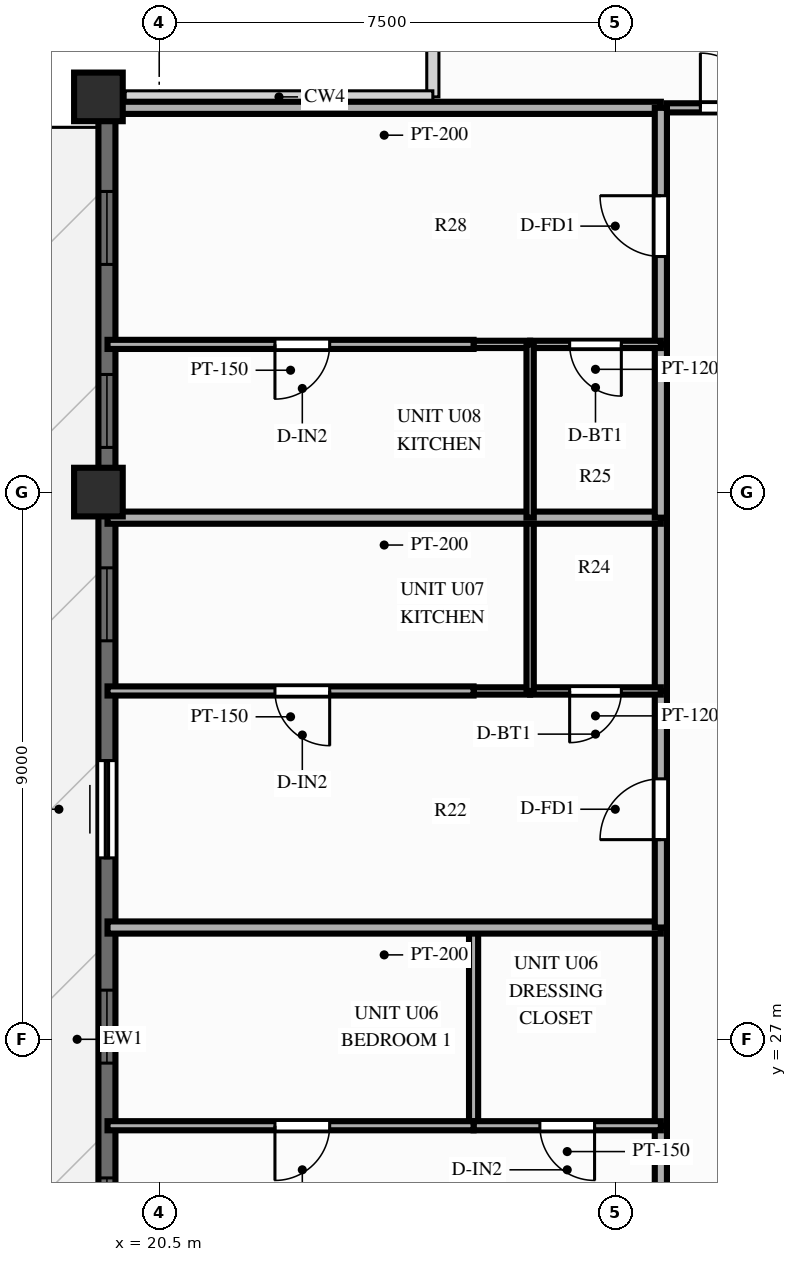
"""IFC4 building model, lengths in metres.
Left out: names, types, materials, properties, quantities, classifications, styles, units other than length and angle.
Written with IfcOpenShell. Run it as: python <this file> out.ifc"""

import sys

from ifc_helpers import new_model, si_unit, direction, frame, frame_2d, origin, origin_2d, place, context, subcontext, project, spatial, rectangle, extrude, source, transform, mapped, element, fill, save


model = new_model("IFC4")
c1 = context("Model", 3, precision=1e-05, world=origin(), true_north=direction((0.0, 1.0)))
c2 = subcontext(c1, "Body", "Model", "MODEL_VIEW")
j1 = project(units=[si_unit("LENGTHUNIT", "METRE"), si_unit("PLANEANGLEUNIT", "RADIAN")], contexts=[c1])
p1 = place(None, origin())
s1 = spatial("IfcSite", under=j1, at=p1, CompositionType="ELEMENT")
p2 = place(p1, origin())
s2 = spatial("IfcBuilding", under=s1, at=p2, CompositionType="ELEMENT")
p3 = place(p2, frame((0.0, 0.0, 196.6)))
s3 = spatial("IfcBuildingStorey", under=s2, at=p3, CompositionType="ELEMENT", Elevation=196.6)
m1 = source(origin(), c2, "Body", "SweptSolid", [
    extrude(rectangle(XDim=0.8, YDim=0.8, at=origin_2d()), origin(), (0.0, 0.0, 1.0), 3.0),
])
for number, where, z_axis, x_axis in (
    (1, (19.5, 42.5, 0.0), (0.0, 0.0, 1.0), (1.0, 0.0, 0.0)),
    (2, (19.5, 36.0, 0.0), (0.0, 0.0, 1.0), (1.0, 0.0, 0.0)),
):
    element("IfcColumn", number, at=place(p3, frame(where, z_axis=z_axis, x_axis=x_axis)), inside=s3, PredefinedType="COLUMN", context=c2, shape_type="MappedRepresentation", body=[
        mapped(m1, transform((0.0, 0.0, 0.0), scale=1.0)),
    ])
p4 = place(p3, frame((19.64, 11.5, 0.0), z_axis=(0.0, 0.0, 1.0), x_axis=(0.0, 1.0, 0.0)))
e3 = element("IfcWall", 3, at=p4, inside=s3, PredefinedType="SOLIDWALL", context=c2, shape_type="SweptSolid", body=[
    extrude(rectangle(XDim=31.0, YDim=0.28, at=frame_2d((15.5, 0.0))), origin(), (0.0, 0.0, 1.0), 2.28),
])
p5 = place(p4, frame((0.811, 0.0, 0.25)))
e4 = element("IfcOpeningElement", 4, at=p5, cuts=e3, PredefinedType="OPENING", context=c2, shape_type="SweptSolid", body=[
    extrude(rectangle(XDim=1.2, YDim=1.5, at=frame_2d((0.6, 0.75))), frame((0.0, 0.152, 0.0), z_axis=(0.0, -1.0, 0.0), x_axis=(1.0, 0.0, 0.0)), (0.0, 0.0, 1.0), 0.304),
])
p6 = place(p4, frame((3.281, 0.0, 0.25)))
e5 = element("IfcOpeningElement", 5, at=p6, cuts=e3, PredefinedType="OPENING", context=c2, shape_type="SweptSolid", body=[
    extrude(rectangle(XDim=1.2, YDim=1.5, at=frame_2d((0.6, 0.75))), frame((0.0, 0.152, 0.0), z_axis=(0.0, -1.0, 0.0), x_axis=(1.0, 0.0, 0.0)), (0.0, 0.0, 1.0), 0.304),
])
p7 = place(p4, frame((7.15, 0.0, 0.25)))
e6 = element("IfcOpeningElement", 6, at=p7, cuts=e3, PredefinedType="OPENING", context=c2, shape_type="SweptSolid", body=[
    extrude(rectangle(XDim=1.2, YDim=1.5, at=frame_2d((0.6, 0.75))), frame((0.0, 0.152, 0.0), z_axis=(0.0, -1.0, 0.0), x_axis=(1.0, 0.0, 0.0)), (0.0, 0.0, 1.0), 0.304),
])
p8 = place(p4, frame((9.36, 0.0, 0.25)))
e7 = element("IfcOpeningElement", 7, at=p8, cuts=e3, PredefinedType="OPENING", context=c2, shape_type="SweptSolid", body=[
    extrude(rectangle(XDim=1.2, YDim=1.5, at=frame_2d((0.6, 0.75))), frame((0.0, 0.152, 0.0), z_axis=(0.0, -1.0, 0.0), x_axis=(1.0, 0.0, 0.0)), (0.0, 0.0, 1.0), 0.304),
])
p9 = place(p4, frame((12.02, 0.0, 0.25)))
e8 = element("IfcOpeningElement", 8, at=p9, cuts=e3, PredefinedType="OPENING", context=c2, shape_type="SweptSolid", body=[
    extrude(rectangle(XDim=1.2, YDim=1.5, at=frame_2d((0.6, 0.75))), frame((0.0, 0.152, 0.0), z_axis=(0.0, -1.0, 0.0), x_axis=(1.0, 0.0, 0.0)), (0.0, 0.0, 1.0), 0.304),
])
p10 = place(p4, frame((15.108, 0.0, 0.25)))
e9 = element("IfcOpeningElement", 9, at=p10, cuts=e3, PredefinedType="OPENING", context=c2, shape_type="SweptSolid", body=[
    extrude(rectangle(XDim=1.2, YDim=1.5, at=frame_2d((0.6, 0.75))), frame((0.0, 0.152, 0.0), z_axis=(0.0, -1.0, 0.0), x_axis=(1.0, 0.0, 0.0)), (0.0, 0.0, 1.0), 0.304),
])
p11 = place(p4, frame((18.484, 0.0, 0.0)))
e10 = element("IfcOpeningElement", 10, at=p11, cuts=e3, PredefinedType="OPENING", context=c2, shape_type="SweptSolid", body=[
    extrude(rectangle(XDim=1.6, YDim=2.15, at=frame_2d((0.8, 1.075))), frame((0.0, 0.152, 0.0), z_axis=(0.0, -1.0, 0.0), x_axis=(1.0, 0.0, 0.0)), (0.0, 0.0, 1.0), 0.304),
])
p12 = place(p4, frame((22.054, 0.0, 0.25)))
e11 = element("IfcOpeningElement", 11, at=p12, cuts=e3, PredefinedType="OPENING", context=c2, shape_type="SweptSolid", body=[
    extrude(rectangle(XDim=1.2, YDim=1.5, at=frame_2d((0.6, 0.75))), frame((0.0, 0.152, 0.0), z_axis=(0.0, -1.0, 0.0), x_axis=(1.0, 0.0, 0.0)), (0.0, 0.0, 1.0), 0.304),
])
p13 = place(p4, frame((25.235, 0.0, 0.25)))
e12 = element("IfcOpeningElement", 12, at=p13, cuts=e3, PredefinedType="OPENING", context=c2, shape_type="SweptSolid", body=[
    extrude(rectangle(XDim=1.2, YDim=1.5, at=frame_2d((0.6, 0.75))), frame((0.0, 0.152, 0.0), z_axis=(0.0, -1.0, 0.0), x_axis=(1.0, 0.0, 0.0)), (0.0, 0.0, 1.0), 0.304),
])
p14 = place(p4, frame((28.245, 0.0, 0.25)))
e13 = element("IfcOpeningElement", 13, at=p14, cuts=e3, PredefinedType="OPENING", context=c2, shape_type="SweptSolid", body=[
    extrude(rectangle(XDim=1.2, YDim=1.5, at=frame_2d((0.6, 0.75))), frame((0.0, 0.152, 0.0), z_axis=(0.0, -1.0, 0.0), x_axis=(1.0, 0.0, 0.0)), (0.0, 0.0, 1.0), 0.304),
])
p15 = place(p3, frame((28.85, 42.32, 0.0), z_axis=(0.0, 0.0, 1.0), x_axis=(1.0, 0.0, 0.0)))
e14 = element("IfcWall", 14, at=p15, inside=s3, PredefinedType="PARTITIONING", context=c2, shape_type="SweptSolid", body=[
    extrude(rectangle(XDim=2.33, YDim=0.15, at=frame_2d((1.165, 0.0))), origin(), (0.0, 0.0, 1.0), 2.79),
])
p16 = place(p15, frame((0.55, 0.0, 0.0)))
e15 = element("IfcOpeningElement", 15, at=p16, cuts=e14, PredefinedType="OPENING", context=c2, shape_type="SweptSolid", body=[
    extrude(rectangle(XDim=0.9, YDim=2.1, at=frame_2d((0.45, 1.05))), frame((0.0, 0.087, 0.0), z_axis=(0.0, -1.0, 0.0), x_axis=(1.0, 0.0, 0.0)), (0.0, 0.0, 1.0), 0.174),
])
p17 = place(p3, frame((28.75, 42.32, 0.0), z_axis=(0.0, 0.0, 1.0), x_axis=(-1.0, 0.0, 0.0)))
e16 = element("IfcWall", 16, at=p17, inside=s3, PredefinedType="PARTITIONING", context=c2, shape_type="SweptSolid", body=[
    extrude(rectangle(XDim=9.1, YDim=0.2, at=frame_2d((4.55, 0.0))), origin(), (0.0, 0.0, 1.0), 2.79),
])
p18 = place(p3, frame((28.75, 22.661, 0.0), z_axis=(0.0, 0.0, 1.0), x_axis=(0.0, 1.0, 0.0)))
e17 = element("IfcWall", 17, at=p18, inside=s3, PredefinedType="PARTITIONING", context=c2, shape_type="SweptSolid", body=[
    extrude(rectangle(XDim=2.917, YDim=0.2, at=frame_2d((1.458, 0.0))), origin(), (0.0, 0.0, 1.0), 2.79),
])
p19 = place(p18, frame((0.958, 0.0, 0.0)))
e18 = element("IfcOpeningElement", 18, at=p19, cuts=e17, PredefinedType="OPENING", context=c2, shape_type="SweptSolid", body=[
    extrude(rectangle(XDim=1.0, YDim=2.15, at=frame_2d((0.5, 1.075))), frame((0.0, 0.112, 0.0), z_axis=(0.0, -1.0, 0.0), x_axis=(1.0, 0.0, 0.0)), (0.0, 0.0, 1.0), 0.224),
])
p20 = place(p3, frame((28.75, 25.578, 0.0), z_axis=(0.0, 0.0, 1.0), x_axis=(0.0, 1.0, 0.0)))
e19 = element("IfcWall", 19, at=p20, inside=s3, PredefinedType="PARTITIONING", context=c2, shape_type="SweptSolid", body=[
    extrude(rectangle(XDim=3.26, YDim=0.2, at=frame_2d((1.63, 0.0))), origin(), (0.0, 0.0, 1.0), 2.79),
])
p21 = place(p3, frame((25.67, 25.578, 0.0), z_axis=(0.0, 0.0, 1.0), x_axis=(0.0, 1.0, 0.0)))
e20 = element("IfcWall", 20, at=p21, inside=s3, PredefinedType="PARTITIONING", context=c2, shape_type="SweptSolid", body=[
    extrude(rectangle(XDim=3.26, YDim=0.15, at=frame_2d((1.63, 0.0))), origin(), (0.0, 0.0, 1.0), 2.49),
])
p22 = place(p3, frame((28.75, 25.578, 0.0), z_axis=(0.0, 0.0, 1.0), x_axis=(-1.0, 0.0, 0.0)))
e21 = element("IfcWall", 21, at=p22, inside=s3, PredefinedType="PARTITIONING", context=c2, shape_type="SweptSolid", body=[
    extrude(rectangle(XDim=3.08, YDim=0.15, at=frame_2d((1.54, 0.0))), origin(), (0.0, 0.0, 1.0), 2.79),
])
p23 = place(p22, frame((1.09, 0.0, 0.0)))
e22 = element("IfcOpeningElement", 22, at=p23, cuts=e21, PredefinedType="OPENING", context=c2, shape_type="SweptSolid", body=[
    extrude(rectangle(XDim=0.9, YDim=2.1, at=frame_2d((0.45, 1.05))), frame((0.0, 0.087, 0.0), z_axis=(0.0, -1.0, 0.0), x_axis=(1.0, 0.0, 0.0)), (0.0, 0.0, 1.0), 0.174),
])
p24 = place(p3, frame((25.67, 25.578, 0.0), z_axis=(0.0, 0.0, 1.0), x_axis=(-1.0, 0.0, 0.0)))
e23 = element("IfcWall", 23, at=p24, inside=s3, PredefinedType="PARTITIONING", context=c2, shape_type="SweptSolid", body=[
    extrude(rectangle(XDim=6.02, YDim=0.15, at=frame_2d((3.01, 0.0))), origin(), (0.0, 0.0, 1.0), 2.79),
])
p25 = place(p24, frame((2.367, 0.0, 0.0)))
e24 = element("IfcOpeningElement", 24, at=p25, cuts=e23, PredefinedType="OPENING", context=c2, shape_type="SweptSolid", body=[
    extrude(rectangle(XDim=0.9, YDim=2.1, at=frame_2d((0.45, 1.05))), frame((0.0, 0.087, 0.0), z_axis=(0.0, -1.0, 0.0), x_axis=(1.0, 0.0, 0.0)), (0.0, 0.0, 1.0), 0.174),
])
p26 = place(p3, frame((28.75, 28.838, 0.0), z_axis=(0.0, 0.0, 1.0), x_axis=(-1.0, 0.0, 0.0)))
e25 = element("IfcWall", 25, at=p26, inside=s3, PredefinedType="PARTITIONING", context=c2, shape_type="SweptSolid", body=[
    extrude(rectangle(XDim=9.1, YDim=0.2, at=frame_2d((4.55, 0.0))), origin(), (0.0, 0.0, 1.0), 2.79),
])
p27 = place(p3, frame((28.75, 28.838, 0.0), z_axis=(0.0, 0.0, 1.0), x_axis=(0.0, 1.0, 0.0)))
e26 = element("IfcWall", 26, at=p27, inside=s3, PredefinedType="PARTITIONING", context=c2, shape_type="SweptSolid", body=[
    extrude(rectangle(XDim=3.891, YDim=0.2, at=frame_2d((1.945, 0.0))), origin(), (0.0, 0.0, 1.0), 2.79),
])
p28 = place(p27, frame((1.445, 0.0, 0.0)))
e27 = element("IfcOpeningElement", 27, at=p28, cuts=e26, PredefinedType="OPENING", context=c2, shape_type="SweptSolid", body=[
    extrude(rectangle(XDim=1.0, YDim=2.15, at=frame_2d((0.5, 1.075))), frame((0.0, 0.112, 0.0), z_axis=(0.0, -1.0, 0.0), x_axis=(1.0, 0.0, 0.0)), (0.0, 0.0, 1.0), 0.224),
])
p29 = place(p3, frame((28.75, 32.729, 0.0), z_axis=(0.0, 0.0, 1.0), x_axis=(0.0, 1.0, 0.0)))
e28 = element("IfcWall", 28, at=p29, inside=s3, PredefinedType="PARTITIONING", context=c2, shape_type="SweptSolid", body=[
    extrude(rectangle(XDim=2.85, YDim=0.2, at=frame_2d((1.425, 0.0))), origin(), (0.0, 0.0, 1.0), 2.79),
])
p30 = place(p3, frame((28.75, 32.729, 0.0), z_axis=(0.0, 0.0, 1.0), x_axis=(-1.0, 0.0, 0.0)))
e29 = element("IfcWall", 29, at=p30, inside=s3, PredefinedType="PARTITIONING", context=c2, shape_type="SweptSolid", body=[
    extrude(rectangle(XDim=2.15, YDim=0.12, at=frame_2d((1.075, 0.0))), origin(), (0.0, 0.0, 1.0), 2.79),
])
p31 = place(p30, frame((0.65, 0.0, 0.0)))
e30 = element("IfcOpeningElement", 30, at=p31, cuts=e29, PredefinedType="OPENING", context=c2, shape_type="SweptSolid", body=[
    extrude(rectangle(XDim=0.85, YDim=2.05, at=frame_2d((0.425, 1.025))), frame((0.0, 0.072, 0.0), z_axis=(0.0, -1.0, 0.0), x_axis=(1.0, 0.0, 0.0)), (0.0, 0.0, 1.0), 0.144),
])
p32 = place(p3, frame((26.6, 32.729, 0.0), z_axis=(0.0, 0.0, 1.0), x_axis=(-1.0, 0.0, 0.0)))
e31 = element("IfcWall", 31, at=p32, inside=s3, PredefinedType="PARTITIONING", context=c2, shape_type="SweptSolid", body=[
    extrude(rectangle(XDim=0.93, YDim=0.12, at=frame_2d((0.465, 0.0))), origin(), (0.0, 0.0, 1.0), 2.79),
])
p33 = place(p3, frame((26.6, 32.729, 0.0), z_axis=(0.0, 0.0, 1.0), x_axis=(0.0, 1.0, 0.0)))
e32 = element("IfcWall", 32, at=p33, inside=s3, PredefinedType="PARTITIONING", context=c2, shape_type="SweptSolid", body=[
    extrude(rectangle(XDim=2.85, YDim=0.12, at=frame_2d((1.425, 0.0))), origin(), (0.0, 0.0, 1.0), 2.79),
])
p34 = place(p3, frame((25.67, 32.729, 0.0), z_axis=(0.0, 0.0, 1.0), x_axis=(-1.0, 0.0, 0.0)))
e33 = element("IfcWall", 33, at=p34, inside=s3, PredefinedType="PARTITIONING", context=c2, shape_type="SweptSolid", body=[
    extrude(rectangle(XDim=6.02, YDim=0.15, at=frame_2d((3.01, 0.0))), origin(), (0.0, 0.0, 1.0), 2.79),
])
p35 = place(p34, frame((2.367, 0.0, 0.0)))
e34 = element("IfcOpeningElement", 34, at=p35, cuts=e33, PredefinedType="OPENING", context=c2, shape_type="SweptSolid", body=[
    extrude(rectangle(XDim=0.9, YDim=2.1, at=frame_2d((0.45, 1.05))), frame((0.0, 0.087, 0.0), z_axis=(0.0, -1.0, 0.0), x_axis=(1.0, 0.0, 0.0)), (0.0, 0.0, 1.0), 0.174),
])
p36 = place(p3, frame((28.75, 35.579, 0.0), z_axis=(0.0, 0.0, 1.0), x_axis=(-1.0, 0.0, 0.0)))
e35 = element("IfcWall", 35, at=p36, inside=s3, PredefinedType="PARTITIONING", context=c2, shape_type="SweptSolid", body=[
    extrude(rectangle(XDim=9.1, YDim=0.2, at=frame_2d((4.55, 0.0))), origin(), (0.0, 0.0, 1.0), 2.79),
])
p37 = place(p3, frame((28.75, 35.579, 0.0), z_axis=(0.0, 0.0, 1.0), x_axis=(0.0, 1.0, 0.0)))
e36 = element("IfcWall", 36, at=p37, inside=s3, PredefinedType="PARTITIONING", context=c2, shape_type="SweptSolid", body=[
    extrude(rectangle(XDim=2.85, YDim=0.2, at=frame_2d((1.425, 0.0))), origin(), (0.0, 0.0, 1.0), 2.79),
])
p38 = place(p3, frame((28.75, 38.429, 0.0), z_axis=(0.0, 0.0, 1.0), x_axis=(0.0, 1.0, 0.0)))
e37 = element("IfcWall", 37, at=p38, inside=s3, PredefinedType="PARTITIONING", context=c2, shape_type="SweptSolid", body=[
    extrude(rectangle(XDim=3.891, YDim=0.2, at=frame_2d((1.945, 0.0))), origin(), (0.0, 0.0, 1.0), 2.79),
])
p39 = place(p38, frame((1.445, 0.0, 0.0)))
e38 = element("IfcOpeningElement", 38, at=p39, cuts=e37, PredefinedType="OPENING", context=c2, shape_type="SweptSolid", body=[
    extrude(rectangle(XDim=1.0, YDim=2.15, at=frame_2d((0.5, 1.075))), frame((0.0, 0.112, 0.0), z_axis=(0.0, -1.0, 0.0), x_axis=(1.0, 0.0, 0.0)), (0.0, 0.0, 1.0), 0.224),
])
p40 = place(p3, frame((28.75, 38.429, 0.0), z_axis=(0.0, 0.0, 1.0), x_axis=(-1.0, 0.0, 0.0)))
e39 = element("IfcWall", 39, at=p40, inside=s3, PredefinedType="PARTITIONING", context=c2, shape_type="SweptSolid", body=[
    extrude(rectangle(XDim=2.15, YDim=0.12, at=frame_2d((1.075, 0.0))), origin(), (0.0, 0.0, 1.0), 2.79),
])
p41 = place(p40, frame((0.65, 0.0, 0.0)))
e40 = element("IfcOpeningElement", 40, at=p41, cuts=e39, PredefinedType="OPENING", context=c2, shape_type="SweptSolid", body=[
    extrude(rectangle(XDim=0.85, YDim=2.05, at=frame_2d((0.425, 1.025))), frame((0.0, 0.072, 0.0), z_axis=(0.0, -1.0, 0.0), x_axis=(1.0, 0.0, 0.0)), (0.0, 0.0, 1.0), 0.144),
])
p42 = place(p3, frame((26.6, 38.429, 0.0), z_axis=(0.0, 0.0, 1.0), x_axis=(-1.0, 0.0, 0.0)))
e41 = element("IfcWall", 41, at=p42, inside=s3, PredefinedType="PARTITIONING", context=c2, shape_type="SweptSolid", body=[
    extrude(rectangle(XDim=0.93, YDim=0.12, at=frame_2d((0.465, 0.0))), origin(), (0.0, 0.0, 1.0), 2.79),
])
p43 = place(p3, frame((26.6, 35.579, 0.0), z_axis=(0.0, 0.0, 1.0), x_axis=(0.0, 1.0, 0.0)))
e42 = element("IfcWall", 42, at=p43, inside=s3, PredefinedType="PARTITIONING", context=c2, shape_type="SweptSolid", body=[
    extrude(rectangle(XDim=2.85, YDim=0.12, at=frame_2d((1.425, 0.0))), origin(), (0.0, 0.0, 1.0), 2.79),
])
p44 = place(p3, frame((25.67, 38.429, 0.0), z_axis=(0.0, 0.0, 1.0), x_axis=(-1.0, 0.0, 0.0)))
e43 = element("IfcWall", 43, at=p44, inside=s3, PredefinedType="PARTITIONING", context=c2, shape_type="SweptSolid", body=[
    extrude(rectangle(XDim=6.02, YDim=0.15, at=frame_2d((3.01, 0.0))), origin(), (0.0, 0.0, 1.0), 2.79),
])
p45 = place(p44, frame((2.367, 0.0, 0.0)))
e44 = element("IfcOpeningElement", 44, at=p45, cuts=e43, PredefinedType="OPENING", context=c2, shape_type="SweptSolid", body=[
    extrude(rectangle(XDim=0.9, YDim=2.1, at=frame_2d((0.45, 1.05))), frame((0.0, 0.087, 0.0), z_axis=(0.0, -1.0, 0.0), x_axis=(1.0, 0.0, 0.0)), (0.0, 0.0, 1.0), 0.174),
])
m2 = source(origin(), c2, "Body", "SweptSolid", [
    extrude(rectangle(XDim=1.2, YDim=1.5, at=frame_2d((0.6, 0.75))), frame((0.0, 0.03, 0.0), z_axis=(0.0, -1.0, 0.0), x_axis=(1.0, 0.0, 0.0)), (0.0, 0.0, 1.0), 0.06),
])
p46 = place(p9, origin())
e45 = element("IfcWindow", 45, at=p46, inside=s3, PartitioningType="SINGLE_PANEL", PredefinedType="WINDOW", context=c2, shape_type="MappedRepresentation", body=[
    mapped(m2, transform((0.0, 0.0, 0.0), scale=1.0)),
])
fill(e8, e45)
p47 = place(p10, origin())
e46 = element("IfcWindow", 46, at=p47, inside=s3, PartitioningType="SINGLE_PANEL", PredefinedType="WINDOW", context=c2, shape_type="MappedRepresentation", body=[
    mapped(m2, transform((0.0, 0.0, 0.0), scale=1.0)),
])
fill(e9, e46)
m3 = source(origin(), c2, "Body", "SweptSolid", [
    extrude(rectangle(XDim=1.6, YDim=2.15, at=frame_2d((0.8, 1.075))), frame((0.0, 0.025, 0.0), z_axis=(0.0, -1.0, 0.0), x_axis=(1.0, 0.0, 0.0)), (0.0, 0.0, 1.0), 0.05),
])
p48 = place(p11, origin())
e47 = element("IfcDoor", 47, at=p48, inside=s3, OperationType="SLIDING_TO_LEFT", PredefinedType="DOOR", context=c2, shape_type="MappedRepresentation", body=[
    mapped(m3, transform((0.0, 0.0, 0.0), scale=1.0)),
])
fill(e10, e47)
p49 = place(p12, origin())
e48 = element("IfcWindow", 48, at=p49, inside=s3, PartitioningType="SINGLE_PANEL", PredefinedType="WINDOW", context=c2, shape_type="MappedRepresentation", body=[
    mapped(m2, transform((0.0, 0.0, 0.0), scale=1.0)),
])
fill(e11, e48)
p50 = place(p13, origin())
e49 = element("IfcWindow", 49, at=p50, inside=s3, PartitioningType="SINGLE_PANEL", PredefinedType="WINDOW", context=c2, shape_type="MappedRepresentation", body=[
    mapped(m2, transform((0.0, 0.0, 0.0), scale=1.0)),
])
fill(e12, e49)
p51 = place(p14, origin())
e50 = element("IfcWindow", 50, at=p51, inside=s3, PartitioningType="SINGLE_PANEL", PredefinedType="WINDOW", context=c2, shape_type="MappedRepresentation", body=[
    mapped(m2, transform((0.0, 0.0, 0.0), scale=1.0)),
])
fill(e13, e50)
m4 = source(origin(), c2, "Body", "SweptSolid", [
    extrude(rectangle(XDim=0.9, YDim=2.1, at=frame_2d((0.45, 1.05))), frame((0.0, 0.025, 0.0), z_axis=(0.0, -1.0, 0.0), x_axis=(1.0, 0.0, 0.0)), (0.0, 0.0, 1.0), 0.05),
])
p52 = place(p16, origin())
e51 = element("IfcDoor", 51, at=p52, inside=s3, OperationType="SINGLE_SWING_LEFT", PredefinedType="DOOR", context=c2, shape_type="MappedRepresentation", body=[
    mapped(m4, transform((0.0, 0.0, 0.0), scale=1.0)),
])
fill(e15, e51)
p53 = place(p23, origin())
e52 = element("IfcDoor", 52, at=p53, inside=s3, OperationType="SINGLE_SWING_LEFT", PredefinedType="DOOR", context=c2, shape_type="MappedRepresentation", body=[
    mapped(m4, transform((0.0, 0.0, 0.0), scale=1.0)),
])
fill(e22, e52)
p54 = place(p25, origin())
e53 = element("IfcDoor", 53, at=p54, inside=s3, OperationType="SINGLE_SWING_RIGHT", PredefinedType="DOOR", context=c2, shape_type="MappedRepresentation", body=[
    mapped(m4, transform((0.0, 0.0, 0.0), scale=1.0)),
])
fill(e24, e53)
m5 = source(origin(), c2, "Body", "SweptSolid", [
    extrude(rectangle(XDim=1.0, YDim=2.15, at=frame_2d((0.5, 1.075))), frame((0.0, 0.025, 0.0), z_axis=(0.0, -1.0, 0.0), x_axis=(1.0, 0.0, 0.0)), (0.0, 0.0, 1.0), 0.05),
])
p55 = place(p28, origin())
e54 = element("IfcDoor", 54, at=p55, inside=s3, OperationType="SINGLE_SWING_LEFT", PredefinedType="DOOR", context=c2, shape_type="MappedRepresentation", body=[
    mapped(m5, transform((0.0, 0.0, 0.0), scale=1.0)),
])
fill(e27, e54)
m6 = source(origin(), c2, "Body", "SweptSolid", [
    extrude(rectangle(XDim=0.85, YDim=2.05, at=frame_2d((0.425, 1.025))), frame((0.0, 0.025, 0.0), z_axis=(0.0, -1.0, 0.0), x_axis=(1.0, 0.0, 0.0)), (0.0, 0.0, 1.0), 0.05),
])
p56 = place(p31, origin())
e55 = element("IfcDoor", 55, at=p56, inside=s3, OperationType="SINGLE_SWING_RIGHT", PredefinedType="DOOR", context=c2, shape_type="MappedRepresentation", body=[
    mapped(m6, transform((0.0, 0.0, 0.0), scale=1.0)),
])
fill(e30, e55)
p57 = place(p35, origin())
e56 = element("IfcDoor", 56, at=p57, inside=s3, OperationType="SINGLE_SWING_LEFT", PredefinedType="DOOR", context=c2, shape_type="MappedRepresentation", body=[
    mapped(m4, transform((0.0, 0.0, 0.0), scale=1.0)),
])
fill(e34, e56)
p58 = place(p39, origin())
e57 = element("IfcDoor", 57, at=p58, inside=s3, OperationType="SINGLE_SWING_RIGHT", PredefinedType="DOOR", context=c2, shape_type="MappedRepresentation", body=[
    mapped(m5, transform((0.0, 0.0, 0.0), scale=1.0)),
])
fill(e38, e57)
p59 = place(p41, origin())
e58 = element("IfcDoor", 58, at=p59, inside=s3, OperationType="SINGLE_SWING_LEFT", PredefinedType="DOOR", context=c2, shape_type="MappedRepresentation", body=[
    mapped(m6, transform((0.0, 0.0, 0.0), scale=1.0)),
])
fill(e40, e58)
p60 = place(p45, origin())
e59 = element("IfcDoor", 59, at=p60, inside=s3, OperationType="SINGLE_SWING_RIGHT", PredefinedType="DOOR", context=c2, shape_type="MappedRepresentation", body=[
    mapped(m4, transform((0.0, 0.0, 0.0), scale=1.0)),
])
fill(e44, e59)
save(model, sys.argv[1])
